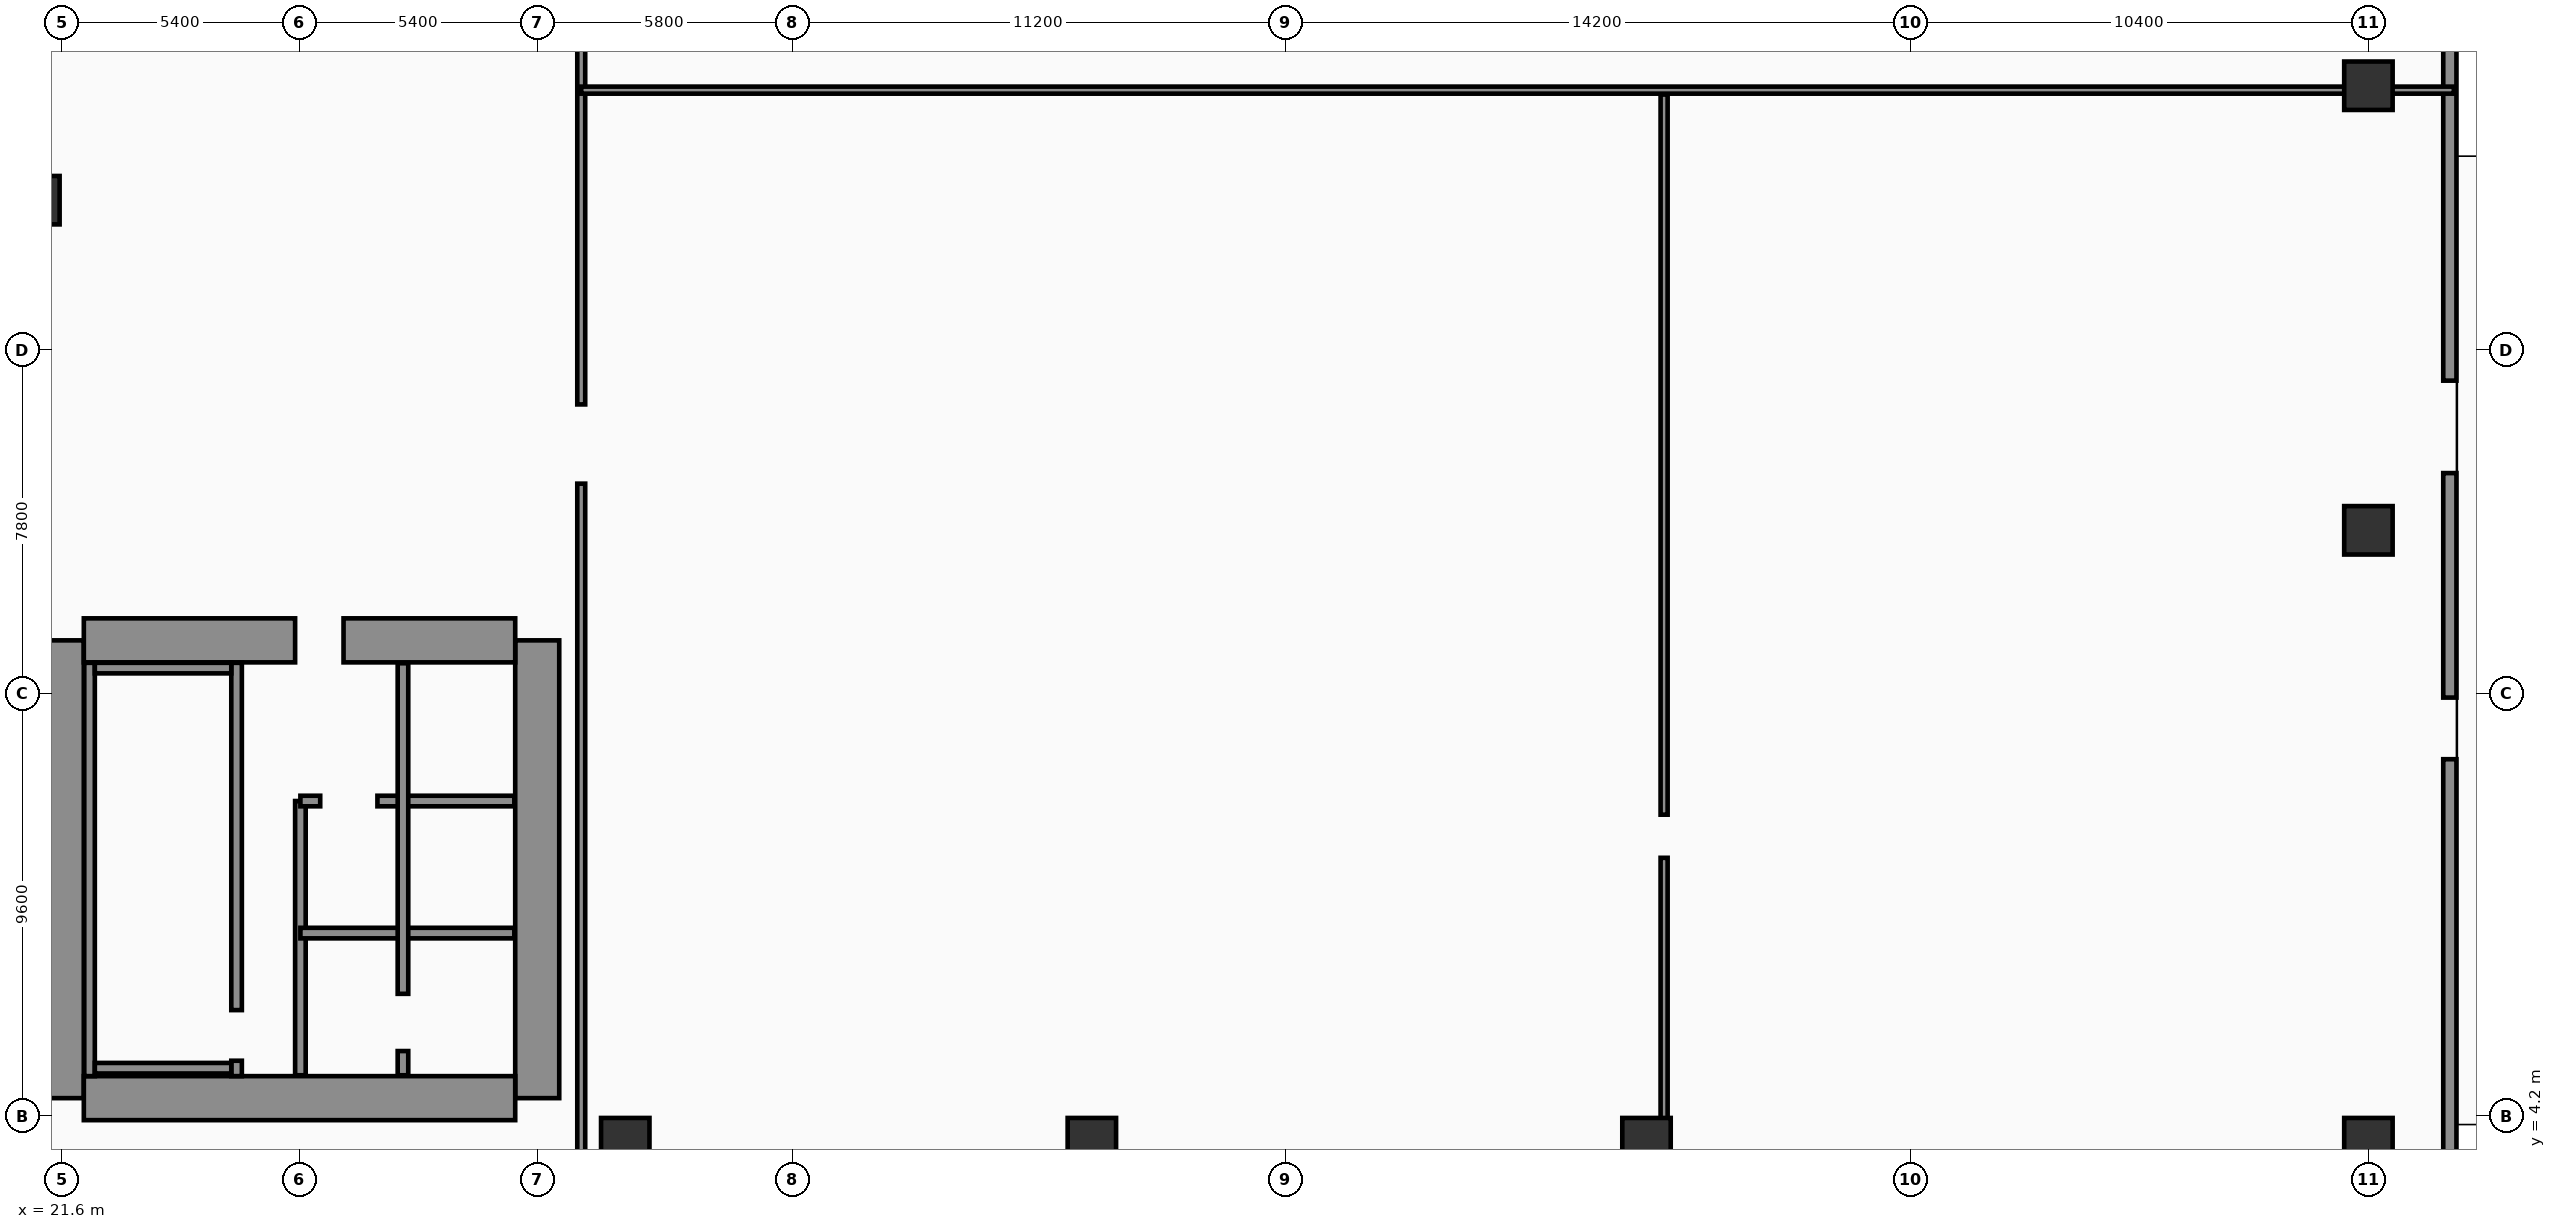
"""IFC4 building model, lengths in metres.
Left out: names, types, materials, properties, quantities, classifications, styles, units other than length and angle.
Written with IfcOpenShell. Run it as: python <this file> out.ifc"""

import sys

from ifc_helpers import new_model, si_unit, direction, frame, frame_2d, origin, origin_2d, place, context, subcontext, project, spatial, rectangle, hollow_rectangle, extrude, element, fill, save


model = new_model("IFC4")
c1 = context("Model", 3, precision=1e-05, world=origin(), true_north=direction((0.0, 1.0)))
c2 = subcontext(c1, "Body", "Model", "MODEL_VIEW")
j1 = project(units=[si_unit("LENGTHUNIT", "METRE"), si_unit("PLANEANGLEUNIT", "RADIAN")], contexts=[c1])
p1 = place(None, origin())
s1 = spatial("IfcSite", under=j1, at=p1, CompositionType="ELEMENT")
p2 = place(p1, origin())
s2 = spatial("IfcBuilding", under=s1, at=p2, CompositionType="ELEMENT")
p3 = place(p2, frame((0.0, 0.0, 17.0)))
s3 = spatial("IfcBuildingStorey", under=s2, at=p3, CompositionType="ELEMENT", Elevation=17.0)
for number, where, z_axis, x_axis in (
    (1, (21.6, 4.6, 0.0), (0.0, 0.0, 1.0), (0.0, 1.0, 0.0)),
    (2, (32.4, 4.6, 0.0), (0.0, 0.0, 1.0), (0.0, 1.0, 0.0)),
):
    element("IfcWall", number, at=place(p3, frame(where, z_axis=z_axis, x_axis=x_axis)), inside=s3, PredefinedType="SHEAR", context=c2, shape_type="SweptSolid", body=[
        extrude(rectangle(XDim=10.4, YDim=1.0, at=frame_2d((5.2, 0.0))), origin(), (0.0, 0.0, 1.0), 4.55),
    ])
p4 = place(p3, frame((22.1, 15.0, 0.0), z_axis=(0.0, 0.0, 1.0), x_axis=(1.0, 0.0, 0.0)))
e3 = element("IfcWall", 3, at=p4, inside=s3, PredefinedType="SHEAR", context=c2, shape_type="SweptSolid", body=[
    extrude(rectangle(XDim=9.8, YDim=1.0, at=frame_2d((4.9, 0.0))), origin(), (0.0, 0.0, 1.0), 4.55),
])
p5 = place(p4, frame((4.8, 0.0, 0.0)))
e4 = element("IfcOpeningElement", 4, at=p5, cuts=e3, PredefinedType="OPENING", context=c2, shape_type="SweptSolid", body=[
    extrude(rectangle(XDim=1.1, YDim=2.2, at=frame_2d((0.55, 1.1))), frame((0.0, 0.51, 0.0), z_axis=(0.0, -1.0, 0.0), x_axis=(1.0, 0.0, 0.0)), (0.0, 0.0, 1.0), 1.02),
])
p6 = place(p3, frame((22.1, 4.6, 0.0), z_axis=(0.0, 0.0, 1.0), x_axis=(1.0, 0.0, 0.0)))
e5 = element("IfcWall", 5, at=p6, inside=s3, PredefinedType="SHEAR", context=c2, shape_type="SweptSolid", body=[
    extrude(rectangle(XDim=9.8, YDim=1.0, at=frame_2d((4.9, 0.0))), origin(), (0.0, 0.0, 1.0), 4.55),
])
p7 = place(p3, frame((22.23, 5.1, 0.0), z_axis=(0.0, 0.0, 1.0), x_axis=(0.0, 1.0, 0.0)))
e6 = element("IfcWall", 6, at=p7, inside=s3, PredefinedType="SOLIDWALL", context=c2, shape_type="SweptSolid", body=[
    extrude(rectangle(XDim=9.39, YDim=0.24, at=frame_2d((4.695, 0.0))), origin(), (0.0, 0.0, 1.0), 4.55),
])
p8 = place(p3, frame((25.57, 5.1, 0.0), z_axis=(0.0, 0.0, 1.0), x_axis=(0.0, 1.0, 0.0)))
e7 = element("IfcWall", 7, at=p8, inside=s3, PredefinedType="SOLIDWALL", context=c2, shape_type="SweptSolid", body=[
    extrude(rectangle(XDim=9.39, YDim=0.24, at=frame_2d((4.695, 0.0))), origin(), (0.0, 0.0, 1.0), 4.55),
])
p9 = place(p8, frame((0.35, 0.0, 0.0)))
e8 = element("IfcOpeningElement", 8, at=p9, cuts=e7, PredefinedType="OPENING", context=c2, shape_type="SweptSolid", body=[
    extrude(rectangle(XDim=1.15, YDim=2.2, at=frame_2d((0.575, 1.1))), frame((0.0, 0.13, 0.0), z_axis=(0.0, -1.0, 0.0), x_axis=(1.0, 0.0, 0.0)), (0.0, 0.0, 1.0), 0.26),
])
for number, where, z_axis, x_axis in (
    (9, (22.35, 5.28, 0.0), (0.0, 0.0, 1.0), (1.0, 0.0, 0.0)),
    (10, (22.35, 14.37, 0.0), (0.0, 0.0, 1.0), (1.0, 0.0, 0.0)),
):
    element("IfcWall", number, at=place(p3, frame(where, z_axis=z_axis, x_axis=x_axis)), inside=s3, PredefinedType="SOLIDWALL", context=c2, shape_type="SweptSolid", body=[
        extrude(rectangle(XDim=3.1, YDim=0.24, at=frame_2d((1.55, 0.0))), origin(), (0.0, 0.0, 1.0), 4.55),
    ])
for number, where, z_axis, x_axis in (
    (11, (21.0, 25.0, 0.0), (0.0, 0.0, 1.0), (1.0, 0.0, 0.0)),
    (12, (34.4, 3.6, 0.0), (0.0, 0.0, 1.0), (1.0, 0.0, 0.0)),
    (13, (45.0, 3.6, 0.0), (0.0, 0.0, 1.0), (1.0, 0.0, 0.0)),
    (14, (57.6, 3.6, 0.0), (0.0, 0.0, 1.0), (1.0, 0.0, 0.0)),
    (15, (74.0, 3.6, 0.0), (0.0, 0.0, 1.0), (1.0, 0.0, 0.0)),
    (16, (74.0, 17.5, 0.0), (0.0, 0.0, 1.0), (1.0, 0.0, 0.0)),
    (17, (74.0, 27.6, 0.0), (0.0, 0.0, 1.0), (1.0, 0.0, 0.0)),
):
    element("IfcColumn", number, at=place(p3, frame(where, z_axis=z_axis, x_axis=x_axis)), inside=s3, PredefinedType="COLUMN", context=c2, shape_type="SweptSolid", body=[
        extrude(hollow_rectangle(XDim=1.1, YDim=1.1, WallThickness=0.045, at=origin_2d()), origin(), (0.0, 0.0, 1.0), 4.55),
    ])
p10 = place(p3, frame((75.85, 2.3, 0.0), z_axis=(0.0, 0.0, 1.0), x_axis=(0.0, 1.0, 0.0)))
e18 = element("IfcWall", 18, at=p10, inside=s3, PredefinedType="SOLIDWALL", context=c2, shape_type="SweptSolid", body=[
    extrude(rectangle(XDim=50.9, YDim=0.3, at=frame_2d((25.45, 0.0))), origin(), (0.0, 0.0, 1.0), 4.55),
])
p11 = place(p10, frame((10.0, 0.0, 0.0)))
e19 = element("IfcOpeningElement", 19, at=p11, cuts=e18, PredefinedType="OPENING", context=c2, shape_type="SweptSolid", body=[
    extrude(rectangle(XDim=1.4, YDim=2.25, at=frame_2d((0.7, 1.125))), frame((0.0, 0.16, 0.0), z_axis=(0.0, -1.0, 0.0), x_axis=(1.0, 0.0, 0.0)), (0.0, 0.0, 1.0), 0.32),
])
p12 = place(p10, frame((31.0, 0.0, 0.0)))
e20 = element("IfcOpeningElement", 20, at=p12, cuts=e18, PredefinedType="OPENING", context=c2, shape_type="SweptSolid", body=[
    extrude(rectangle(XDim=1.4, YDim=2.25, at=frame_2d((0.7, 1.125))), frame((0.0, 0.16, 0.0), z_axis=(0.0, -1.0, 0.0), x_axis=(1.0, 0.0, 0.0)), (0.0, 0.0, 1.0), 0.32),
])
p13 = place(p10, frame((16.5, 0.0, 0.85)))
e21 = element("IfcOpeningElement", 21, at=p13, cuts=e18, PredefinedType="OPENING", context=c2, shape_type="SweptSolid", body=[
    extrude(rectangle(XDim=2.1, YDim=2.1, at=frame_2d((1.05, 1.05))), frame((0.0, 0.16, 0.0), z_axis=(0.0, -1.0, 0.0), x_axis=(1.0, 0.0, 0.0)), (0.0, 0.0, 1.0), 0.32),
])
p14 = place(p10, frame((34.5, 0.0, 0.85)))
e22 = element("IfcOpeningElement", 22, at=p14, cuts=e18, PredefinedType="OPENING", context=c2, shape_type="SweptSolid", body=[
    extrude(rectangle(XDim=2.1, YDim=2.1, at=frame_2d((1.05, 1.05))), frame((0.0, 0.16, 0.0), z_axis=(0.0, -1.0, 0.0), x_axis=(1.0, 0.0, 0.0)), (0.0, 0.0, 1.0), 0.32),
])
p15 = place(p3, frame((27.02, 5.12, 0.0), z_axis=(0.0, 0.0, 1.0), x_axis=(0.0, 1.0, 0.0)))
e23 = element("IfcWall", 23, at=p15, inside=s3, PredefinedType="SOLIDWALL", context=c2, shape_type="SweptSolid", body=[
    extrude(rectangle(XDim=6.23, YDim=0.24, at=frame_2d((3.115, 0.0))), origin(), (0.0, 0.0, 1.0), 4.55),
])
p16 = place(p3, frame((27.02, 11.35, 0.0), z_axis=(0.0, 0.0, 1.0), x_axis=(1.0, 0.0, 0.0)))
e24 = element("IfcWall", 24, at=p16, inside=s3, PredefinedType="SOLIDWALL", context=c2, shape_type="SweptSolid", body=[
    extrude(rectangle(XDim=4.86, YDim=0.24, at=frame_2d((2.43, 0.0))), origin(), (0.0, 0.0, 1.0), 4.55),
])
p17 = place(p16, frame((0.45, 0.0, 0.0)))
e25 = element("IfcOpeningElement", 25, at=p17, cuts=e24, PredefinedType="OPENING", context=c2, shape_type="SweptSolid", body=[
    extrude(rectangle(XDim=1.3, YDim=2.35, at=frame_2d((0.65, 1.175))), frame((0.0, 0.13, 0.0), z_axis=(0.0, -1.0, 0.0), x_axis=(1.0, 0.0, 0.0)), (0.0, 0.0, 1.0), 0.26),
])
p18 = place(p3, frame((27.02, 8.35, 0.0), z_axis=(0.0, 0.0, 1.0), x_axis=(1.0, 0.0, 0.0)))
e26 = element("IfcWall", 26, at=p18, inside=s3, PredefinedType="SOLIDWALL", context=c2, shape_type="SweptSolid", body=[
    extrude(rectangle(XDim=4.86, YDim=0.24, at=frame_2d((2.43, 0.0))), origin(), (0.0, 0.0, 1.0), 4.55),
])
p19 = place(p3, frame((29.35, 5.12, 0.0), z_axis=(0.0, 0.0, 1.0), x_axis=(0.0, 1.0, 0.0)))
e27 = element("IfcWall", 27, at=p19, inside=s3, PredefinedType="SOLIDWALL", context=c2, shape_type="SweptSolid", body=[
    extrude(rectangle(XDim=9.36, YDim=0.24, at=frame_2d((4.68, 0.0))), origin(), (0.0, 0.0, 1.0), 4.55),
])
p20 = place(p19, frame((0.55, 0.0, 0.0)))
e28 = element("IfcOpeningElement", 28, at=p20, cuts=e27, PredefinedType="OPENING", context=c2, shape_type="SweptSolid", body=[
    extrude(rectangle(XDim=1.3, YDim=2.35, at=frame_2d((0.65, 1.175))), frame((0.0, 0.13, 0.0), z_axis=(0.0, -1.0, 0.0), x_axis=(1.0, 0.0, 0.0)), (0.0, 0.0, 1.0), 0.26),
])
p21 = place(p3, frame((58.0, 0.06, 0.0), z_axis=(0.0, 0.0, 1.0), x_axis=(0.0, 1.0, 0.0)))
e29 = element("IfcWall", 29, at=p21, inside=s3, PredefinedType="PARTITIONING", context=c2, shape_type="SweptSolid", body=[
    extrude(rectangle(XDim=27.34, YDim=0.16, at=frame_2d((13.67, 0.0))), origin(), (0.0, 0.0, 1.0), 3.05),
])
p22 = place(p21, frame((10.0, 0.0, 0.0)))
e30 = element("IfcOpeningElement", 30, at=p22, cuts=e29, PredefinedType="OPENING", context=c2, shape_type="SweptSolid", body=[
    extrude(rectangle(XDim=0.98, YDim=2.15, at=frame_2d((0.49, 1.075))), frame((0.0, 0.09, 0.0), z_axis=(0.0, -1.0, 0.0), x_axis=(1.0, 0.0, 0.0)), (0.0, 0.0, 1.0), 0.18),
])
p23 = place(p3, frame((33.4, 0.06, 0.0), z_axis=(0.0, 0.0, 1.0), x_axis=(0.0, 1.0, 0.0)))
e31 = element("IfcWall", 31, at=p23, inside=s3, PredefinedType="PARTITIONING", context=c2, shape_type="SweptSolid", body=[
    extrude(rectangle(XDim=55.38, YDim=0.18, at=frame_2d((27.69, 0.0))), origin(), (0.0, 0.0, 1.0), 3.75),
])
p24 = place(p23, frame((18.5, 0.0, 0.0)))
e32 = element("IfcOpeningElement", 32, at=p24, cuts=e31, PredefinedType="OPENING", context=c2, shape_type="SweptSolid", body=[
    extrude(rectangle(XDim=1.8, YDim=2.4, at=frame_2d((0.9, 1.2))), frame((0.0, 0.1, 0.0), z_axis=(0.0, -1.0, 0.0), x_axis=(1.0, 0.0, 0.0)), (0.0, 0.0, 1.0), 0.2),
])
p25 = place(p23, frame((31.0, 0.0, 0.0)))
e33 = element("IfcOpeningElement", 33, at=p25, cuts=e31, PredefinedType="OPENING", context=c2, shape_type="SweptSolid", body=[
    extrude(rectangle(XDim=1.8, YDim=2.4, at=frame_2d((0.9, 1.2))), frame((0.0, 0.1, 0.0), z_axis=(0.0, -1.0, 0.0), x_axis=(1.0, 0.0, 0.0)), (0.0, 0.0, 1.0), 0.2),
])
p26 = place(p3, frame((33.4, 27.5, 0.0), z_axis=(0.0, 0.0, 1.0), x_axis=(1.0, 0.0, 0.0)))
e34 = element("IfcWall", 34, at=p26, inside=s3, PredefinedType="PARTITIONING", context=c2, shape_type="SweptSolid", body=[
    extrude(rectangle(XDim=42.54, YDim=0.16, at=frame_2d((21.27, 0.0))), origin(), (0.0, 0.0, 1.0), 3.05),
])
p27 = place(p11, origin())
e35 = element("IfcDoor", 35, at=p27, inside=s3, OperationType="SINGLE_SWING_LEFT", PredefinedType="DOOR", context=c2, shape_type="SweptSolid", body=[
    extrude(rectangle(XDim=1.4, YDim=2.25, at=frame_2d((0.7, 1.125))), frame((0.0, 0.025, 0.0), z_axis=(0.0, -1.0, 0.0), x_axis=(1.0, 0.0, 0.0)), (0.0, 0.0, 1.0), 0.05),
])
fill(e19, e35)
p28 = place(p13, origin())
e36 = element("IfcWindow", 36, at=p28, inside=s3, PartitioningType="SINGLE_PANEL", PredefinedType="WINDOW", context=c2, shape_type="SweptSolid", body=[
    extrude(rectangle(XDim=2.1, YDim=2.1, at=frame_2d((1.05, 1.05))), frame((0.0, 0.03, 0.0), z_axis=(0.0, -1.0, 0.0), x_axis=(1.0, 0.0, 0.0)), (0.0, 0.0, 1.0), 0.06),
])
fill(e21, e36)
p29 = place(p17, origin())
e37 = element("IfcDoor", 37, at=p29, inside=s3, OperationType="DOUBLE_DOOR_SLIDING", PredefinedType="DOOR", context=c2, shape_type="SweptSolid", body=[
    extrude(rectangle(XDim=1.3, YDim=2.35, at=frame_2d((0.65, 1.175))), frame((0.0, 0.025, 0.0), z_axis=(0.0, -1.0, 0.0), x_axis=(1.0, 0.0, 0.0)), (0.0, 0.0, 1.0), 0.05),
])
fill(e25, e37)
p30 = place(p20, origin())
e38 = element("IfcDoor", 38, at=p30, inside=s3, OperationType="DOUBLE_DOOR_SLIDING", PredefinedType="DOOR", context=c2, shape_type="SweptSolid", body=[
    extrude(rectangle(XDim=1.3, YDim=2.35, at=frame_2d((0.65, 1.175))), frame((0.0, 0.025, 0.0), z_axis=(0.0, -1.0, 0.0), x_axis=(1.0, 0.0, 0.0)), (0.0, 0.0, 1.0), 0.05),
])
fill(e28, e38)
p31 = place(p22, origin())
e39 = element("IfcDoor", 39, at=p31, inside=s3, OperationType="SINGLE_SWING_LEFT", PredefinedType="DOOR", context=c2, shape_type="SweptSolid", body=[
    extrude(rectangle(XDim=0.98, YDim=2.15, at=frame_2d((0.49, 1.075))), frame((0.0, 0.025, 0.0), z_axis=(0.0, -1.0, 0.0), x_axis=(1.0, 0.0, 0.0)), (0.0, 0.0, 1.0), 0.05),
])
fill(e30, e39)
p32 = place(p24, origin())
e40 = element("IfcDoor", 40, at=p32, inside=s3, OperationType="SINGLE_SWING_LEFT", PredefinedType="DOOR", context=c2, shape_type="SweptSolid", body=[
    extrude(rectangle(XDim=1.8, YDim=2.4, at=frame_2d((0.9, 1.2))), frame((0.0, 0.025, 0.0), z_axis=(0.0, -1.0, 0.0), x_axis=(1.0, 0.0, 0.0)), (0.0, 0.0, 1.0), 0.05),
])
fill(e32, e40)
p33 = place(p9, origin())
e41 = element("IfcDoor", 41, at=p33, inside=s3, OperationType="SINGLE_SWING_RIGHT", PredefinedType="DOOR", context=c2, shape_type="SweptSolid", body=[
    extrude(rectangle(XDim=1.15, YDim=2.2, at=frame_2d((0.575, 1.1))), frame((0.0, 0.025, 0.0), z_axis=(0.0, -1.0, 0.0), x_axis=(1.0, 0.0, 0.0)), (0.0, 0.0, 1.0), 0.05),
])
fill(e8, e41)
p34 = place(p5, origin())
e42 = element("IfcDoor", 42, at=p34, inside=s3, OperationType="SINGLE_SWING_LEFT", PredefinedType="DOOR", context=c2, shape_type="SweptSolid", body=[
    extrude(rectangle(XDim=1.1, YDim=2.2, at=frame_2d((0.55, 1.1))), frame((0.0, 0.025, 0.0), z_axis=(0.0, -1.0, 0.0), x_axis=(1.0, 0.0, 0.0)), (0.0, 0.0, 1.0), 0.05),
])
fill(e4, e42)
save(model, sys.argv[1])
